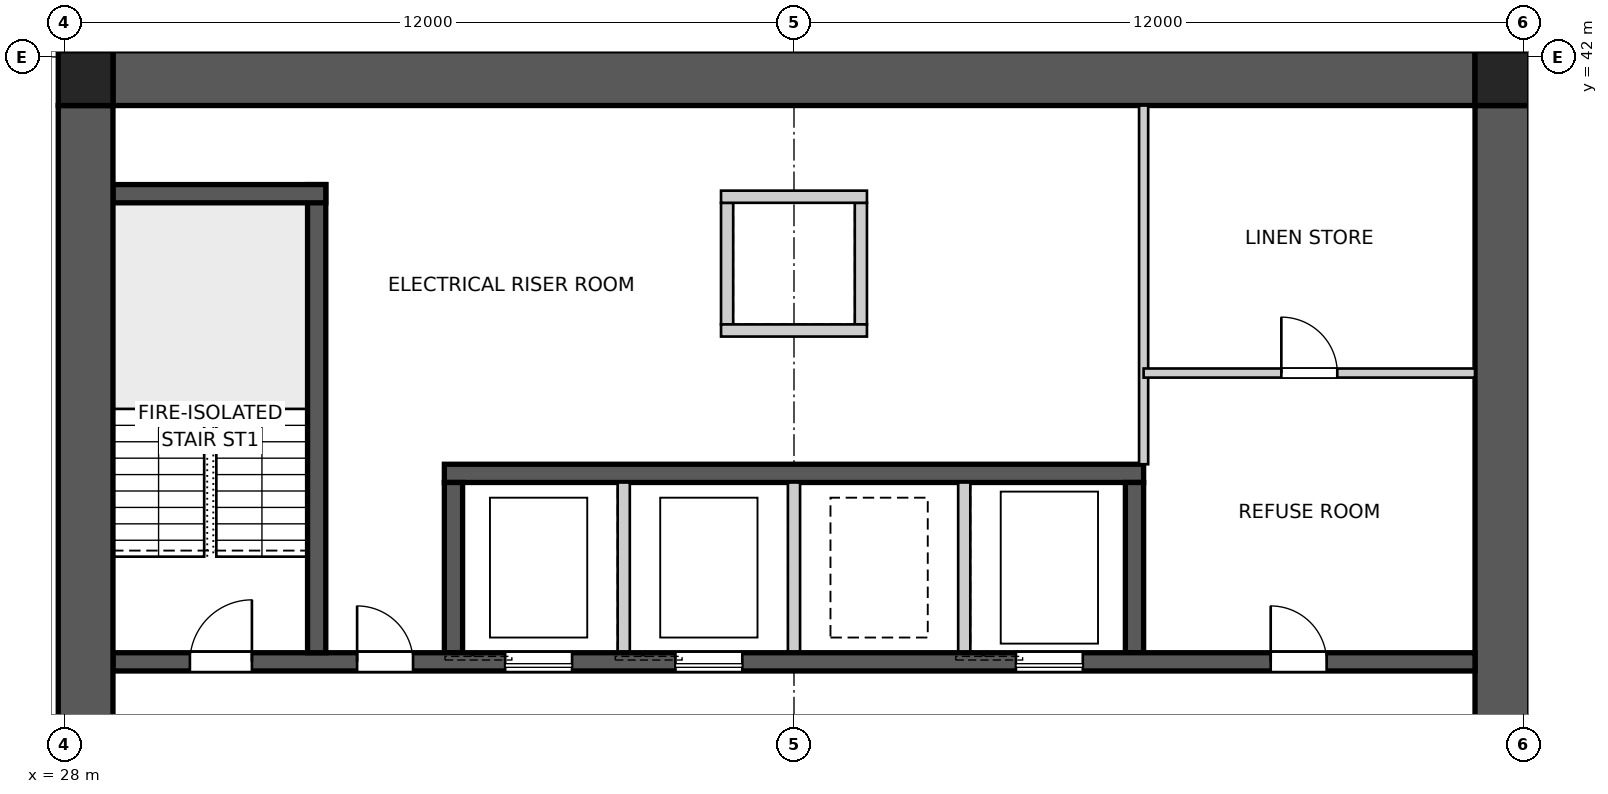
"""IFC4 building model, lengths in metres.
Left out: names, types, materials, properties, quantities, classifications, styles, units other than length and angle.
Written with IfcOpenShell. Run it as: python <this file> out.ifc"""

import sys

from ifc_helpers import new_model, si_unit, direction, frame, frame_2d, origin, origin_2d, place, context, subcontext, project, spatial, polyline, rectangle, outline, extrude, element, fill, save


model = new_model("IFC4")
c1 = context("Model", 3, precision=1e-05, world=origin(), true_north=direction((0.0, 1.0)))
c2 = subcontext(c1, "Body", "Model", "MODEL_VIEW")
j1 = project(units=[si_unit("LENGTHUNIT", "METRE"), si_unit("PLANEANGLEUNIT", "RADIAN")], contexts=[c1])
p1 = place(None, origin())
s1 = spatial("IfcSite", under=j1, at=p1, CompositionType="ELEMENT")
p2 = place(p1, origin())
s2 = spatial("IfcBuilding", under=s1, at=p2, CompositionType="ELEMENT")
p3 = place(p2, frame((0.0, 0.0, 54.0)))
s3 = spatial("IfcBuildingStorey", under=s2, at=p3, CompositionType="ELEMENT", Elevation=54.0)
p4 = place(p3, frame((28.8, 41.65, 0.0), z_axis=(0.0, 0.0, 1.0), x_axis=(1.0, 0.0, 0.0)))
e1 = element("IfcWall", 1, at=p4, inside=s3, PredefinedType="SHEAR", context=c2, shape_type="SweptSolid", body=[
    extrude(outline(polyline([(0.0, -0.45), (22.4, -0.45), (22.4, -0.025), (22.85, -0.025), (22.85, 0.025), (22.4, 0.025), (22.4, 0.45), (0.0, 0.45), (0.0, 0.025), (-0.45, 0.025), (-0.45, -0.025), (0.0, -0.025), (0.0, -0.45)])), origin(), (0.0, 0.0, 1.0), 3.4),
])
p5 = place(p3, frame((51.65, 18.8, 0.0), z_axis=(0.0, 0.0, 1.0), x_axis=(0.0, 1.0, 0.0)))
e2 = element("IfcWall", 2, at=p5, inside=s3, PredefinedType="SHEAR", context=c2, shape_type="SweptSolid", body=[
    extrude(outline(polyline([(0.0, -0.45), (22.4, -0.45), (22.4, -0.025), (22.85, -0.025), (22.85, 0.025), (22.4, 0.025), (22.4, 0.45), (0.0, 0.45), (0.0, 0.025), (-0.45, 0.025), (-0.45, -0.025), (0.0, -0.025), (0.0, -0.45)])), origin(), (0.0, 0.0, 1.0), 3.4),
])
p6 = place(p5, frame((11.14, 0.0, 0.0)))
e3 = element("IfcOpeningElement", 3, at=p6, cuts=e2, PredefinedType="OPENING", context=c2, shape_type="SweptSolid", body=[
    extrude(rectangle(XDim=1.02, YDim=2.4, at=frame_2d((0.51, 1.2))), frame((0.0, 0.46, 0.0), z_axis=(0.0, -1.0, 0.0), x_axis=(1.0, 0.0, 0.0)), (0.0, 0.0, 1.0), 0.92),
])
p7 = place(p3, frame((28.35, 41.2, 0.0), z_axis=(0.0, 0.0, 1.0), x_axis=(0.0, -1.0, 0.0)))
e4 = element("IfcWall", 4, at=p7, inside=s3, PredefinedType="SHEAR", context=c2, shape_type="SweptSolid", body=[
    extrude(outline(polyline([(0.0, -0.45), (22.4, -0.45), (22.4, -0.025), (22.85, -0.025), (22.85, 0.025), (22.4, 0.025), (22.4, 0.45), (0.0, 0.45), (0.0, 0.025), (-0.45, 0.025), (-0.45, -0.025), (0.0, -0.025), (0.0, -0.45)])), origin(), (0.0, 0.0, 1.0), 3.4),
])
p8 = place(p7, frame((11.14, 0.0, 0.0)))
e5 = element("IfcOpeningElement", 5, at=p8, cuts=e4, PredefinedType="OPENING", context=c2, shape_type="SweptSolid", body=[
    extrude(rectangle(XDim=1.02, YDim=2.4, at=frame_2d((0.51, 1.2))), frame((0.0, 0.46, 0.0), z_axis=(0.0, -1.0, 0.0), x_axis=(1.0, 0.0, 0.0)), (0.0, 0.0, 1.0), 0.92),
])
p9 = place(p3, frame((28.8, 32.05, 0.0), z_axis=(0.0, 0.0, 1.0), x_axis=(1.0, 0.0, 0.0)))
e6 = element("IfcWall", 6, at=p9, inside=s3, PredefinedType="SHEAR", context=c2, shape_type="SweptSolid", body=[
    extrude(rectangle(XDim=22.4, YDim=0.3, at=frame_2d((11.2, 0.0))), origin(), (0.0, 0.0, 1.0), 3.4),
])
p10 = place(p9, frame((19.04, 0.0, 0.0)))
e7 = element("IfcOpeningElement", 7, at=p10, cuts=e6, PredefinedType="OPENING", context=c2, shape_type="SweptSolid", body=[
    extrude(rectangle(XDim=0.92, YDim=2.1, at=frame_2d((0.46, 1.05))), frame((0.0, 0.16, 0.0), z_axis=(0.0, -1.0, 0.0), x_axis=(1.0, 0.0, 0.0)), (0.0, 0.0, 1.0), 0.32),
])
p11 = place(p9, frame((1.265, 0.0, 0.0)))
e8 = element("IfcOpeningElement", 8, at=p11, cuts=e6, PredefinedType="OPENING", context=c2, shape_type="SweptSolid", body=[
    extrude(rectangle(XDim=1.02, YDim=2.1, at=frame_2d((0.51, 1.05))), frame((0.0, 0.16, 0.0), z_axis=(0.0, -1.0, 0.0), x_axis=(1.0, 0.0, 0.0)), (0.0, 0.0, 1.0), 0.32),
])
p12 = place(p9, frame((4.015, 0.0, 0.0)))
e9 = element("IfcOpeningElement", 9, at=p12, cuts=e6, PredefinedType="OPENING", context=c2, shape_type="SweptSolid", body=[
    extrude(rectangle(XDim=0.92, YDim=2.1, at=frame_2d((0.46, 1.05))), frame((0.0, 0.16, 0.0), z_axis=(0.0, -1.0, 0.0), x_axis=(1.0, 0.0, 0.0)), (0.0, 0.0, 1.0), 0.32),
])
p13 = place(p9, frame((6.45, 0.0, 0.0)))
e10 = element("IfcOpeningElement", 10, at=p13, cuts=e6, PredefinedType="OPENING", context=c2, shape_type="SweptSolid", body=[
    extrude(rectangle(XDim=1.1, YDim=2.1, at=frame_2d((0.55, 1.05))), frame((0.0, 0.16, 0.0), z_axis=(0.0, -1.0, 0.0), x_axis=(1.0, 0.0, 0.0)), (0.0, 0.0, 1.0), 0.32),
])
p14 = place(p9, frame((9.25, 0.0, 0.0)))
e11 = element("IfcOpeningElement", 11, at=p14, cuts=e6, PredefinedType="OPENING", context=c2, shape_type="SweptSolid", body=[
    extrude(rectangle(XDim=1.1, YDim=2.1, at=frame_2d((0.55, 1.05))), frame((0.0, 0.16, 0.0), z_axis=(0.0, -1.0, 0.0), x_axis=(1.0, 0.0, 0.0)), (0.0, 0.0, 1.0), 0.32),
])
p15 = place(p9, frame((14.85, 0.0, 0.0)))
e12 = element("IfcOpeningElement", 12, at=p15, cuts=e6, PredefinedType="OPENING", context=c2, shape_type="SweptSolid", body=[
    extrude(rectangle(XDim=1.1, YDim=2.1, at=frame_2d((0.55, 1.05))), frame((0.0, 0.16, 0.0), z_axis=(0.0, -1.0, 0.0), x_axis=(1.0, 0.0, 0.0)), (0.0, 0.0, 1.0), 0.32),
])
p16 = place(p3, frame((34.25, 35.15, 0.0), z_axis=(0.0, 0.0, 1.0), x_axis=(1.0, 0.0, 0.0)))
e13 = element("IfcWall", 13, at=p16, inside=s3, PredefinedType="SHEAR", context=c2, shape_type="SweptSolid", body=[
    extrude(rectangle(XDim=11.5, YDim=0.3, at=frame_2d((5.75, 0.0))), origin(), (0.0, 0.0, 1.0), 3.4),
])
p17 = place(p3, frame((34.4, 32.2, 0.0), z_axis=(0.0, 0.0, 1.0), x_axis=(0.0, 1.0, 0.0)))
e14 = element("IfcWall", 14, at=p17, inside=s3, PredefinedType="SHEAR", context=c2, shape_type="SweptSolid", body=[
    extrude(rectangle(XDim=2.8, YDim=0.3, at=frame_2d((1.4, 0.0))), origin(), (0.0, 0.0, 1.0), 3.4),
])
for number, where, z_axis, x_axis in (
    (15, (37.2, 32.2, 0.0), (0.0, 0.0, 1.0), (0.0, 1.0, 0.0)),
    (16, (40.0, 32.2, 0.0), (0.0, 0.0, 1.0), (0.0, 1.0, 0.0)),
    (17, (42.8, 32.2, 0.0), (0.0, 0.0, 1.0), (0.0, 1.0, 0.0)),
):
    element("IfcWall", number, at=place(p3, frame(where, z_axis=z_axis, x_axis=x_axis)), inside=s3, PredefinedType="SOLIDWALL", context=c2, shape_type="SweptSolid", body=[
        extrude(rectangle(XDim=2.8, YDim=0.2, at=frame_2d((1.4, 0.0))), origin(), (0.0, 0.0, 1.0), 3.4),
    ])
p18 = place(p3, frame((45.6, 32.2, 0.0), z_axis=(0.0, 0.0, 1.0), x_axis=(0.0, 1.0, 0.0)))
e18 = element("IfcWall", 18, at=p18, inside=s3, PredefinedType="SHEAR", context=c2, shape_type="SweptSolid", body=[
    extrude(rectangle(XDim=2.8, YDim=0.3, at=frame_2d((1.4, 0.0))), origin(), (0.0, 0.0, 1.0), 3.4),
])
p19 = place(p3, frame((32.15, 32.2, 0.0), z_axis=(0.0, 0.0, 1.0), x_axis=(0.0, 1.0, 0.0)))
e19 = element("IfcWall", 19, at=p19, inside=s3, PredefinedType="SHEAR", context=c2, shape_type="SweptSolid", body=[
    extrude(rectangle(XDim=7.7, YDim=0.3, at=frame_2d((3.85, 0.0))), origin(), (0.0, 0.0, 1.0), 3.4),
])
p20 = place(p3, frame((28.8, 39.75, 0.0), z_axis=(0.0, 0.0, 1.0), x_axis=(1.0, 0.0, 0.0)))
e20 = element("IfcWall", 20, at=p20, inside=s3, PredefinedType="SHEAR", context=c2, shape_type="SweptSolid", body=[
    extrude(rectangle(XDim=3.5, YDim=0.3, at=frame_2d((1.75, 0.0))), origin(), (0.0, 0.0, 1.0), 3.4),
])
for number, where, z_axis, x_axis in (
    (21, (38.9, 37.6, 0.0), (0.0, 0.0, 1.0), (0.0, 1.0, 0.0)),
    (22, (41.1, 37.6, 0.0), (0.0, 0.0, 1.0), (0.0, 1.0, 0.0)),
):
    element("IfcWall", number, at=place(p3, frame(where, z_axis=z_axis, x_axis=x_axis)), inside=s3, PredefinedType="SOLIDWALL", context=c2, shape_type="SweptSolid", body=[
        extrude(rectangle(XDim=2.0, YDim=0.2, at=frame_2d((1.0, 0.0))), origin(), (0.0, 0.0, 1.0), 3.4),
    ])
for number, where, z_axis, x_axis in (
    (23, (38.8, 37.5, 0.0), (0.0, 0.0, 1.0), (1.0, 0.0, 0.0)),
    (24, (38.8, 39.7, 0.0), (0.0, 0.0, 1.0), (1.0, 0.0, 0.0)),
):
    element("IfcWall", number, at=place(p3, frame(where, z_axis=z_axis, x_axis=x_axis)), inside=s3, PredefinedType="SOLIDWALL", context=c2, shape_type="SweptSolid", body=[
        extrude(rectangle(XDim=2.4, YDim=0.2, at=frame_2d((1.2, 0.0))), origin(), (0.0, 0.0, 1.0), 3.4),
    ])
for number, where, z_axis, x_axis in (
    (25, (51.65, 41.65, 0.0), (0.0, 0.0, 1.0), (1.0, 0.0, 0.0)),
    (26, (28.35, 41.65, 0.0), (0.0, 0.0, 1.0), (1.0, 0.0, 0.0)),
):
    element("IfcColumn", number, at=place(p3, frame(where, z_axis=z_axis, x_axis=x_axis)), inside=s3, PredefinedType="COLUMN", context=c2, shape_type="SweptSolid", body=[
        extrude(rectangle(XDim=0.9, YDim=0.9, at=origin_2d()), origin(), (0.0, 0.0, 1.0), 3.4),
    ])
p21 = place(p3, frame((45.75, 41.2, 0.0), z_axis=(0.0, 0.0, 1.0), x_axis=(0.0, -1.0, 0.0)))
e27 = element("IfcWall", 27, at=p21, inside=s3, PredefinedType="SOLIDWALL", context=c2, shape_type="SweptSolid", body=[
    extrude(rectangle(XDim=5.9, YDim=0.15, at=frame_2d((2.95, 0.0))), origin(), (0.0, 0.0, 1.0), 3.25),
])
p22 = place(p3, frame((45.75, 36.8, 0.0), z_axis=(0.0, 0.0, 1.0), x_axis=(1.0, 0.0, 0.0)))
e28 = element("IfcWall", 28, at=p22, inside=s3, PredefinedType="SOLIDWALL", context=c2, shape_type="SweptSolid", body=[
    extrude(rectangle(XDim=5.45, YDim=0.15, at=frame_2d((2.725, 0.0))), origin(), (0.0, 0.0, 1.0), 3.25),
])
p23 = place(p22, frame((2.265, 0.0, 0.0)))
e29 = element("IfcOpeningElement", 29, at=p23, cuts=e28, PredefinedType="OPENING", context=c2, shape_type="SweptSolid", body=[
    extrude(rectangle(XDim=0.92, YDim=2.1, at=frame_2d((0.46, 1.05))), frame((0.0, 0.085, 0.0), z_axis=(0.0, -1.0, 0.0), x_axis=(1.0, 0.0, 0.0)), (0.0, 0.0, 1.0), 0.17),
])
p24 = place(p10, origin())
e30 = element("IfcDoor", 30, at=p24, inside=s3, OperationType="SINGLE_SWING_LEFT", PredefinedType="DOOR", context=c2, shape_type="SweptSolid", body=[
    extrude(rectangle(XDim=0.92, YDim=2.1, at=frame_2d((0.46, 1.05))), frame((0.0, 0.025, 0.0), z_axis=(0.0, -1.0, 0.0), x_axis=(1.0, 0.0, 0.0)), (0.0, 0.0, 1.0), 0.05),
])
fill(e7, e30)
p25 = place(p11, origin())
e31 = element("IfcDoor", 31, at=p25, inside=s3, OperationType="SINGLE_SWING_RIGHT", PredefinedType="DOOR", context=c2, shape_type="SweptSolid", body=[
    extrude(rectangle(XDim=1.02, YDim=2.1, at=frame_2d((0.51, 1.05))), frame((0.0, 0.025, 0.0), z_axis=(0.0, -1.0, 0.0), x_axis=(1.0, 0.0, 0.0)), (0.0, 0.0, 1.0), 0.05),
])
fill(e8, e31)
p26 = place(p12, origin())
e32 = element("IfcDoor", 32, at=p26, inside=s3, OperationType="SINGLE_SWING_LEFT", PredefinedType="DOOR", context=c2, shape_type="SweptSolid", body=[
    extrude(rectangle(XDim=0.92, YDim=2.1, at=frame_2d((0.46, 1.05))), frame((0.0, 0.025, 0.0), z_axis=(0.0, -1.0, 0.0), x_axis=(1.0, 0.0, 0.0)), (0.0, 0.0, 1.0), 0.05),
])
fill(e9, e32)
p27 = place(p23, origin())
e33 = element("IfcDoor", 33, at=p27, inside=s3, OperationType="SINGLE_SWING_LEFT", PredefinedType="DOOR", context=c2, shape_type="SweptSolid", body=[
    extrude(rectangle(XDim=0.92, YDim=2.1, at=frame_2d((0.46, 1.05))), frame((0.0, 0.025, 0.0), z_axis=(0.0, -1.0, 0.0), x_axis=(1.0, 0.0, 0.0)), (0.0, 0.0, 1.0), 0.05),
])
fill(e29, e33)
p28 = place(p13, origin())
e34 = element("IfcDoor", 34, at=p28, inside=s3, OperationType="SLIDING_TO_LEFT", PredefinedType="DOOR", context=c2, shape_type="SweptSolid", body=[
    extrude(rectangle(XDim=1.1, YDim=2.1, at=frame_2d((0.55, 1.05))), frame((0.0, 0.025, 0.0), z_axis=(0.0, -1.0, 0.0), x_axis=(1.0, 0.0, 0.0)), (0.0, 0.0, 1.0), 0.05),
])
fill(e10, e34)
p29 = place(p14, origin())
e35 = element("IfcDoor", 35, at=p29, inside=s3, OperationType="SLIDING_TO_LEFT", PredefinedType="DOOR", context=c2, shape_type="SweptSolid", body=[
    extrude(rectangle(XDim=1.1, YDim=2.1, at=frame_2d((0.55, 1.05))), frame((0.0, 0.025, 0.0), z_axis=(0.0, -1.0, 0.0), x_axis=(1.0, 0.0, 0.0)), (0.0, 0.0, 1.0), 0.05),
])
fill(e11, e35)
p30 = place(p15, origin())
e36 = element("IfcDoor", 36, at=p30, inside=s3, OperationType="SLIDING_TO_LEFT", PredefinedType="DOOR", context=c2, shape_type="SweptSolid", body=[
    extrude(rectangle(XDim=1.1, YDim=2.1, at=frame_2d((0.55, 1.05))), frame((0.0, 0.025, 0.0), z_axis=(0.0, -1.0, 0.0), x_axis=(1.0, 0.0, 0.0)), (0.0, 0.0, 1.0), 0.05),
])
fill(e12, e36)
save(model, sys.argv[1])
